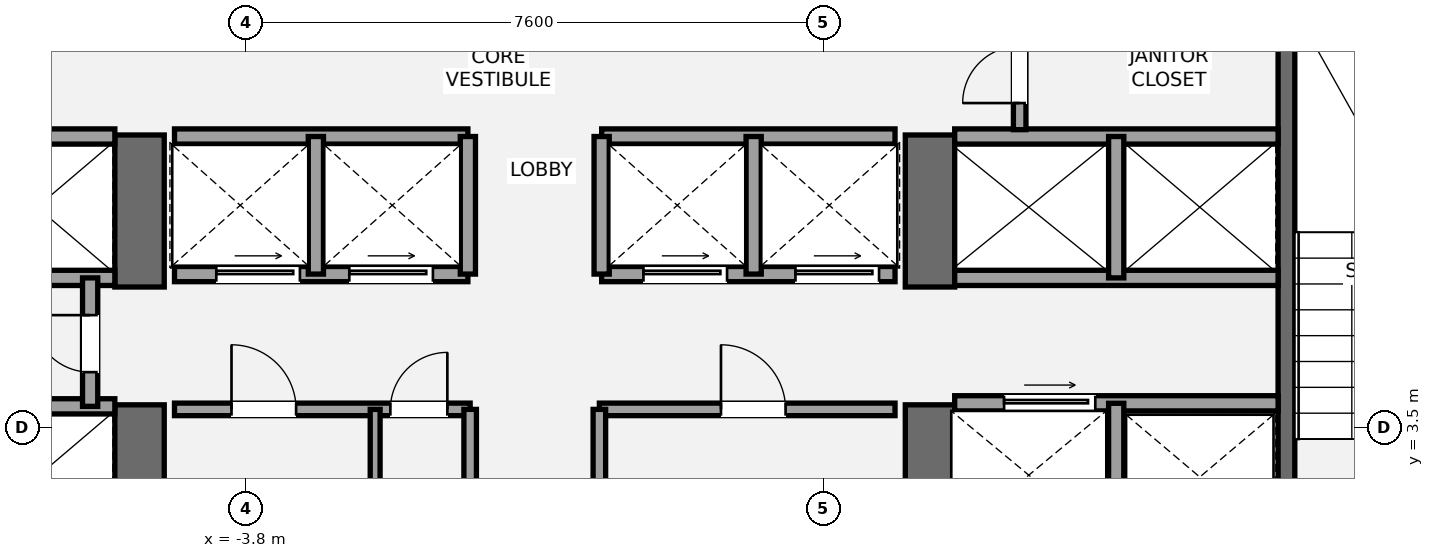
"""IFC4 building model, lengths in metres.
Left out: names, types, materials, properties, quantities, classifications, styles, units other than length and angle.
Written with IfcOpenShell. Run it as: python <this file> out.ifc"""

import sys

from ifc_helpers import new_model, si_unit, direction, frame, frame_2d, origin, place, context, subcontext, project, spatial, rectangle, extrude, element, fill, save


model = new_model("IFC4")
c1 = context("Model", 3, precision=1e-05, world=origin(), true_north=direction((0.0, 1.0)))
c2 = subcontext(c1, "Body", "Model", "MODEL_VIEW")
j1 = project(units=[si_unit("LENGTHUNIT", "METRE"), si_unit("PLANEANGLEUNIT", "RADIAN")], contexts=[c1])
p1 = place(None, origin())
s1 = spatial("IfcSite", under=j1, at=p1, CompositionType="ELEMENT")
p2 = place(p1, origin())
s2 = spatial("IfcBuilding", under=s1, at=p2, CompositionType="ELEMENT")
p3 = place(p2, frame((0.0, 0.0, 166.2)))
s3 = spatial("IfcBuildingStorey", under=s2, at=p3, CompositionType="ELEMENT", Elevation=166.2)
p4 = place(p3, frame((-5.2, 1.2, 0.0), z_axis=(0.0, 0.0, 1.0), x_axis=(0.0, 1.0, 0.0)))
e1 = element("IfcWall", 1, at=p4, inside=s3, PredefinedType="SHEAR", context=c2, shape_type="SweptSolid", body=[
    extrude(rectangle(XDim=2.6, YDim=0.65, at=frame_2d((1.3, 0.0))), origin(), (0.0, 0.0, 1.0), 3.2),
])
p5 = place(p3, frame((-5.2, 5.35, 0.0), z_axis=(0.0, 0.0, 1.0), x_axis=(0.0, 1.0, 0.0)))
e2 = element("IfcWall", 2, at=p5, inside=s3, PredefinedType="SHEAR", context=c2, shape_type="SweptSolid", body=[
    extrude(rectangle(XDim=2.0, YDim=0.65, at=frame_2d((1.0, 0.0))), origin(), (0.0, 0.0, 1.0), 3.2),
])
p6 = place(p3, frame((5.2, 1.2, 0.0), z_axis=(0.0, 0.0, 1.0), x_axis=(0.0, 1.0, 0.0)))
e3 = element("IfcWall", 3, at=p6, inside=s3, PredefinedType="SHEAR", context=c2, shape_type="SweptSolid", body=[
    extrude(rectangle(XDim=2.6, YDim=0.65, at=frame_2d((1.3, 0.0))), origin(), (0.0, 0.0, 1.0), 3.2),
])
p7 = place(p3, frame((5.2, 5.35, 0.0), z_axis=(0.0, 0.0, 1.0), x_axis=(0.0, 1.0, 0.0)))
e4 = element("IfcWall", 4, at=p7, inside=s3, PredefinedType="SHEAR", context=c2, shape_type="SweptSolid", body=[
    extrude(rectangle(XDim=2.0, YDim=0.65, at=frame_2d((1.0, 0.0))), origin(), (0.0, 0.0, 1.0), 3.2),
])
p8 = place(p3, frame((9.89, 1.85, 0.0), z_axis=(0.0, 0.0, 1.0), x_axis=(0.0, 1.0, 0.0)))
e5 = element("IfcWall", 5, at=p8, inside=s3, PredefinedType="SHEAR", context=c2, shape_type="SweptSolid", body=[
    extrude(rectangle(XDim=7.15, YDim=0.22, at=frame_2d((3.575, 0.0))), origin(), (0.0, 0.0, 1.0), 3.2),
])
for number, where, z_axis, x_axis in (
    (6, (-9.78, 3.78, 0.0), (0.0, 0.0, 1.0), (1.0, 0.0, 0.0)),
    (7, (-9.78, 5.47, 0.0), (0.0, 0.0, 1.0), (1.0, 0.0, 0.0)),
    (8, (-9.78, 7.33, 0.0), (0.0, 0.0, 1.0), (1.0, 0.0, 0.0)),
):
    element("IfcWall", number, at=place(p3, frame(where, z_axis=z_axis, x_axis=x_axis)), inside=s3, PredefinedType="SOLIDWALL", context=c2, shape_type="SweptSolid", body=[
        extrude(rectangle(XDim=4.255, YDim=0.2, at=frame_2d((2.127, 0.0))), origin(), (0.0, 0.0, 1.0), 3.02),
    ])
p9 = place(p3, frame((-5.85, 3.78, 0.0), z_axis=(0.0, 0.0, 1.0), x_axis=(0.0, 1.0, 0.0)))
e9 = element("IfcWall", 9, at=p9, inside=s3, PredefinedType="SOLIDWALL", context=c2, shape_type="SweptSolid", body=[
    extrude(rectangle(XDim=1.69, YDim=0.2, at=frame_2d((0.845, 0.0))), origin(), (0.0, 0.0, 1.0), 3.02),
])
p10 = place(p9, frame((0.45, 0.0, 0.0)))
e10 = element("IfcOpeningElement", 10, at=p10, cuts=e9, PredefinedType="OPENING", context=c2, shape_type="SweptSolid", body=[
    extrude(rectangle(XDim=0.75, YDim=2.1, at=frame_2d((0.375, 1.05))), frame((0.0, 0.11, 0.0), z_axis=(0.0, -1.0, 0.0), x_axis=(1.0, 0.0, 0.0)), (0.0, 0.0, 1.0), 0.22),
])
p11 = place(p3, frame((5.525, 3.82, 0.0), z_axis=(0.0, 0.0, 1.0), x_axis=(1.0, 0.0, 0.0)))
e11 = element("IfcWall", 11, at=p11, inside=s3, PredefinedType="SOLIDWALL", context=c2, shape_type="SweptSolid", body=[
    extrude(rectangle(XDim=4.255, YDim=0.2, at=frame_2d((2.127, 0.0))), origin(), (0.0, 0.0, 1.0), 3.02),
])
p12 = place(p11, frame((0.65, 0.0, 0.0)))
e12 = element("IfcOpeningElement", 12, at=p12, cuts=e11, PredefinedType="OPENING", context=c2, shape_type="SweptSolid", body=[
    extrude(rectangle(XDim=1.2, YDim=2.2, at=frame_2d((0.6, 1.1))), frame((0.0, 0.11, 0.0), z_axis=(0.0, -1.0, 0.0), x_axis=(1.0, 0.0, 0.0)), (0.0, 0.0, 1.0), 0.22),
])
p13 = place(p3, frame((7.65, 1.85, 0.0), z_axis=(0.0, 0.0, 1.0), x_axis=(0.0, 1.0, 0.0)))
e13 = element("IfcWall", 13, at=p13, inside=s3, PredefinedType="SOLIDWALL", context=c2, shape_type="SweptSolid", body=[
    extrude(rectangle(XDim=1.97, YDim=0.2, at=frame_2d((0.985, 0.0))), origin(), (0.0, 0.0, 1.0), 3.02),
])
for number, where, z_axis, x_axis in (
    (14, (5.525, 5.47, 0.0), (0.0, 0.0, 1.0), (1.0, 0.0, 0.0)),
    (15, (5.525, 7.33, 0.0), (0.0, 0.0, 1.0), (1.0, 0.0, 0.0)),
):
    element("IfcWall", number, at=place(p3, frame(where, z_axis=z_axis, x_axis=x_axis)), inside=s3, PredefinedType="SOLIDWALL", context=c2, shape_type="SweptSolid", body=[
        extrude(rectangle(XDim=4.255, YDim=0.2, at=frame_2d((2.127, 0.0))), origin(), (0.0, 0.0, 1.0), 3.02),
    ])
p14 = place(p3, frame((7.65, 5.47, 0.0), z_axis=(0.0, 0.0, 1.0), x_axis=(0.0, 1.0, 0.0)))
e16 = element("IfcWall", 16, at=p14, inside=s3, PredefinedType="SOLIDWALL", context=c2, shape_type="SweptSolid", body=[
    extrude(rectangle(XDim=1.86, YDim=0.2, at=frame_2d((0.93, 0.0))), origin(), (0.0, 0.0, 1.0), 3.02),
])
p15 = place(p3, frame((-4.74, 3.74, 0.0), z_axis=(0.0, 0.0, 1.0), x_axis=(1.0, 0.0, 0.0)))
e17 = element("IfcWall", 17, at=p15, inside=s3, PredefinedType="PARTITIONING", context=c2, shape_type="SweptSolid", body=[
    extrude(rectangle(XDim=3.89, YDim=0.165, at=frame_2d((1.945, 0.0))), origin(), (0.0, 0.0, 1.0), 3.02),
])
p16 = place(p15, frame((0.75, 0.0, 0.0)))
e18 = element("IfcOpeningElement", 18, at=p16, cuts=e17, PredefinedType="OPENING", context=c2, shape_type="SweptSolid", body=[
    extrude(rectangle(XDim=0.85, YDim=2.1, at=frame_2d((0.425, 1.05))), frame((0.0, 0.093, 0.0), z_axis=(0.0, -1.0, 0.0), x_axis=(1.0, 0.0, 0.0)), (0.0, 0.0, 1.0), 0.185),
])
p17 = place(p15, frame((2.84, 0.0, 0.0)))
e19 = element("IfcOpeningElement", 19, at=p17, cuts=e17, PredefinedType="OPENING", context=c2, shape_type="SweptSolid", body=[
    extrude(rectangle(XDim=0.75, YDim=2.1, at=frame_2d((0.375, 1.05))), frame((0.0, 0.093, 0.0), z_axis=(0.0, -1.0, 0.0), x_axis=(1.0, 0.0, 0.0)), (0.0, 0.0, 1.0), 0.185),
])
p18 = place(p3, frame((-0.85, 1.92, 0.0), z_axis=(0.0, 0.0, 1.0), x_axis=(0.0, 1.0, 0.0)))
e20 = element("IfcWall", 20, at=p18, inside=s3, PredefinedType="PARTITIONING", context=c2, shape_type="SweptSolid", body=[
    extrude(rectangle(XDim=1.82, YDim=0.165, at=frame_2d((0.91, 0.0))), origin(), (0.0, 0.0, 1.0), 3.02),
])
p19 = place(p3, frame((0.85, 3.74, 0.0), z_axis=(0.0, 0.0, 1.0), x_axis=(1.0, 0.0, 0.0)))
e21 = element("IfcWall", 21, at=p19, inside=s3, PredefinedType="PARTITIONING", context=c2, shape_type="SweptSolid", body=[
    extrude(rectangle(XDim=3.89, YDim=0.165, at=frame_2d((1.945, 0.0))), origin(), (0.0, 0.0, 1.0), 3.02),
])
p20 = place(p19, frame((1.6, 0.0, 0.0)))
e22 = element("IfcOpeningElement", 22, at=p20, cuts=e21, PredefinedType="OPENING", context=c2, shape_type="SweptSolid", body=[
    extrude(rectangle(XDim=0.85, YDim=2.1, at=frame_2d((0.425, 1.05))), frame((0.0, 0.093, 0.0), z_axis=(0.0, -1.0, 0.0), x_axis=(1.0, 0.0, 0.0)), (0.0, 0.0, 1.0), 0.185),
])
p21 = place(p3, frame((0.85, 1.92, 0.0), z_axis=(0.0, 0.0, 1.0), x_axis=(0.0, 1.0, 0.0)))
e23 = element("IfcWall", 23, at=p21, inside=s3, PredefinedType="PARTITIONING", context=c2, shape_type="SweptSolid", body=[
    extrude(rectangle(XDim=1.82, YDim=0.165, at=frame_2d((0.91, 0.0))), origin(), (0.0, 0.0, 1.0), 3.02),
])
p22 = place(p3, frame((-2.1, 1.92, 0.0), z_axis=(0.0, 0.0, 1.0), x_axis=(0.0, 1.0, 0.0)))
e24 = element("IfcWall", 24, at=p22, inside=s3, PredefinedType="PARTITIONING", context=c2, shape_type="SweptSolid", body=[
    extrude(rectangle(XDim=1.82, YDim=0.13, at=frame_2d((0.91, 0.0))), origin(), (0.0, 0.0, 1.0), 3.02),
])
p23 = place(p3, frame((-4.74, 5.52, 0.0), z_axis=(0.0, 0.0, 1.0), x_axis=(1.0, 0.0, 0.0)))
e25 = element("IfcWall", 25, at=p23, inside=s3, PredefinedType="SOLIDWALL", context=c2, shape_type="SweptSolid", body=[
    extrude(rectangle(XDim=3.86, YDim=0.2, at=frame_2d((1.93, 0.0))), origin(), (0.0, 0.0, 1.0), 3.02),
])
p24 = place(p23, frame((0.55, 0.0, 0.0)))
e26 = element("IfcOpeningElement", 26, at=p24, cuts=e25, PredefinedType="OPENING", context=c2, shape_type="SweptSolid", body=[
    extrude(rectangle(XDim=1.1, YDim=2.2, at=frame_2d((0.55, 1.1))), frame((0.0, 0.11, 0.0), z_axis=(0.0, -1.0, 0.0), x_axis=(1.0, 0.0, 0.0)), (0.0, 0.0, 1.0), 0.22),
])
p25 = place(p23, frame((2.3, 0.0, 0.0)))
e27 = element("IfcOpeningElement", 27, at=p25, cuts=e25, PredefinedType="OPENING", context=c2, shape_type="SweptSolid", body=[
    extrude(rectangle(XDim=1.1, YDim=2.2, at=frame_2d((0.55, 1.1))), frame((0.0, 0.11, 0.0), z_axis=(0.0, -1.0, 0.0), x_axis=(1.0, 0.0, 0.0)), (0.0, 0.0, 1.0), 0.22),
])
p26 = place(p3, frame((0.88, 5.52, 0.0), z_axis=(0.0, 0.0, 1.0), x_axis=(1.0, 0.0, 0.0)))
e28 = element("IfcWall", 28, at=p26, inside=s3, PredefinedType="SOLIDWALL", context=c2, shape_type="SweptSolid", body=[
    extrude(rectangle(XDim=3.86, YDim=0.2, at=frame_2d((1.93, 0.0))), origin(), (0.0, 0.0, 1.0), 3.02),
])
p27 = place(p26, frame((0.55, 0.0, 0.0)))
e29 = element("IfcOpeningElement", 29, at=p27, cuts=e28, PredefinedType="OPENING", context=c2, shape_type="SweptSolid", body=[
    extrude(rectangle(XDim=1.1, YDim=2.2, at=frame_2d((0.55, 1.1))), frame((0.0, 0.11, 0.0), z_axis=(0.0, -1.0, 0.0), x_axis=(1.0, 0.0, 0.0)), (0.0, 0.0, 1.0), 0.22),
])
p28 = place(p26, frame((2.55, 0.0, 0.0)))
e30 = element("IfcOpeningElement", 30, at=p28, cuts=e28, PredefinedType="OPENING", context=c2, shape_type="SweptSolid", body=[
    extrude(rectangle(XDim=1.1, YDim=2.2, at=frame_2d((0.55, 1.1))), frame((0.0, 0.11, 0.0), z_axis=(0.0, -1.0, 0.0), x_axis=(1.0, 0.0, 0.0)), (0.0, 0.0, 1.0), 0.22),
])
for number, where, z_axis, x_axis in (
    (31, (-4.74, 7.33, 0.0), (0.0, 0.0, 1.0), (1.0, 0.0, 0.0)),
    (32, (0.88, 7.33, 0.0), (0.0, 0.0, 1.0), (1.0, 0.0, 0.0)),
):
    element("IfcWall", number, at=place(p3, frame(where, z_axis=z_axis, x_axis=x_axis)), inside=s3, PredefinedType="SOLIDWALL", context=c2, shape_type="SweptSolid", body=[
        extrude(rectangle(XDim=3.86, YDim=0.2, at=frame_2d((1.93, 0.0))), origin(), (0.0, 0.0, 1.0), 3.02),
    ])
for number, where, z_axis, x_axis in (
    (33, (-2.88, 5.52, 0.0), (0.0, 0.0, 1.0), (0.0, 1.0, 0.0)),
    (34, (2.88, 5.52, 0.0), (0.0, 0.0, 1.0), (0.0, 1.0, 0.0)),
    (35, (-0.88, 5.52, 0.0), (0.0, 0.0, 1.0), (0.0, 1.0, 0.0)),
    (36, (0.88, 5.52, 0.0), (0.0, 0.0, 1.0), (0.0, 1.0, 0.0)),
):
    element("IfcWall", number, at=place(p3, frame(where, z_axis=z_axis, x_axis=x_axis)), inside=s3, PredefinedType="SOLIDWALL", context=c2, shape_type="SweptSolid", body=[
        extrude(rectangle(XDim=1.81, YDim=0.2, at=frame_2d((0.905, 0.0))), origin(), (0.0, 0.0, 1.0), 3.02),
    ])
p29 = place(p3, frame((6.38, 7.42, 0.0), z_axis=(0.0, 0.0, 1.0), x_axis=(0.0, 1.0, 0.0)))
e37 = element("IfcWall", 37, at=p29, inside=s3, PredefinedType="PARTITIONING", context=c2, shape_type="SweptSolid", body=[
    extrude(rectangle(XDim=1.58, YDim=0.165, at=frame_2d((0.79, 0.0))), origin(), (0.0, 0.0, 1.0), 3.02),
])
p30 = place(p29, frame((0.35, 0.0, 0.0)))
e38 = element("IfcOpeningElement", 38, at=p30, cuts=e37, PredefinedType="OPENING", context=c2, shape_type="SweptSolid", body=[
    extrude(rectangle(XDim=0.75, YDim=2.1, at=frame_2d((0.375, 1.05))), frame((0.0, 0.093, 0.0), z_axis=(0.0, -1.0, 0.0), x_axis=(1.0, 0.0, 0.0)), (0.0, 0.0, 1.0), 0.185),
])
p31 = place(p10, origin())
e39 = element("IfcDoor", 39, at=p31, inside=s3, OperationType="SINGLE_SWING_RIGHT", PredefinedType="DOOR", context=c2, shape_type="SweptSolid", body=[
    extrude(rectangle(XDim=0.75, YDim=2.1, at=frame_2d((0.375, 1.05))), frame((0.0, 0.025, 0.0), z_axis=(0.0, -1.0, 0.0), x_axis=(1.0, 0.0, 0.0)), (0.0, 0.0, 1.0), 0.05),
])
fill(e10, e39)
p32 = place(p12, origin())
e40 = element("IfcDoor", 40, at=p32, inside=s3, OperationType="SLIDING_TO_RIGHT", PredefinedType="DOOR", context=c2, shape_type="SweptSolid", body=[
    extrude(rectangle(XDim=1.2, YDim=2.2, at=frame_2d((0.6, 1.1))), frame((0.0, 0.025, 0.0), z_axis=(0.0, -1.0, 0.0), x_axis=(1.0, 0.0, 0.0)), (0.0, 0.0, 1.0), 0.05),
])
fill(e12, e40)
p33 = place(p16, origin())
e41 = element("IfcDoor", 41, at=p33, inside=s3, OperationType="SINGLE_SWING_LEFT", PredefinedType="DOOR", context=c2, shape_type="SweptSolid", body=[
    extrude(rectangle(XDim=0.85, YDim=2.1, at=frame_2d((0.425, 1.05))), frame((0.0, 0.025, 0.0), z_axis=(0.0, -1.0, 0.0), x_axis=(1.0, 0.0, 0.0)), (0.0, 0.0, 1.0), 0.05),
])
fill(e18, e41)
p34 = place(p17, origin())
e42 = element("IfcDoor", 42, at=p34, inside=s3, OperationType="SINGLE_SWING_RIGHT", PredefinedType="DOOR", context=c2, shape_type="SweptSolid", body=[
    extrude(rectangle(XDim=0.75, YDim=2.1, at=frame_2d((0.375, 1.05))), frame((0.0, 0.025, 0.0), z_axis=(0.0, -1.0, 0.0), x_axis=(1.0, 0.0, 0.0)), (0.0, 0.0, 1.0), 0.05),
])
fill(e19, e42)
p35 = place(p20, origin())
e43 = element("IfcDoor", 43, at=p35, inside=s3, OperationType="SINGLE_SWING_LEFT", PredefinedType="DOOR", context=c2, shape_type="SweptSolid", body=[
    extrude(rectangle(XDim=0.85, YDim=2.1, at=frame_2d((0.425, 1.05))), frame((0.0, 0.025, 0.0), z_axis=(0.0, -1.0, 0.0), x_axis=(1.0, 0.0, 0.0)), (0.0, 0.0, 1.0), 0.05),
])
fill(e22, e43)
p36 = place(p24, origin())
e44 = element("IfcDoor", 44, at=p36, inside=s3, OperationType="SLIDING_TO_LEFT", PredefinedType="DOOR", context=c2, shape_type="SweptSolid", body=[
    extrude(rectangle(XDim=1.1, YDim=2.2, at=frame_2d((0.55, 1.1))), frame((0.0, 0.025, 0.0), z_axis=(0.0, -1.0, 0.0), x_axis=(1.0, 0.0, 0.0)), (0.0, 0.0, 1.0), 0.05),
])
fill(e26, e44)
p37 = place(p25, origin())
e45 = element("IfcDoor", 45, at=p37, inside=s3, OperationType="SLIDING_TO_LEFT", PredefinedType="DOOR", context=c2, shape_type="SweptSolid", body=[
    extrude(rectangle(XDim=1.1, YDim=2.2, at=frame_2d((0.55, 1.1))), frame((0.0, 0.025, 0.0), z_axis=(0.0, -1.0, 0.0), x_axis=(1.0, 0.0, 0.0)), (0.0, 0.0, 1.0), 0.05),
])
fill(e27, e45)
p38 = place(p27, origin())
e46 = element("IfcDoor", 46, at=p38, inside=s3, OperationType="SLIDING_TO_LEFT", PredefinedType="DOOR", context=c2, shape_type="SweptSolid", body=[
    extrude(rectangle(XDim=1.1, YDim=2.2, at=frame_2d((0.55, 1.1))), frame((0.0, 0.025, 0.0), z_axis=(0.0, -1.0, 0.0), x_axis=(1.0, 0.0, 0.0)), (0.0, 0.0, 1.0), 0.05),
])
fill(e29, e46)
p39 = place(p28, origin())
e47 = element("IfcDoor", 47, at=p39, inside=s3, OperationType="SLIDING_TO_LEFT", PredefinedType="DOOR", context=c2, shape_type="SweptSolid", body=[
    extrude(rectangle(XDim=1.1, YDim=2.2, at=frame_2d((0.55, 1.1))), frame((0.0, 0.025, 0.0), z_axis=(0.0, -1.0, 0.0), x_axis=(1.0, 0.0, 0.0)), (0.0, 0.0, 1.0), 0.05),
])
fill(e30, e47)
p40 = place(p30, origin())
e48 = element("IfcDoor", 48, at=p40, inside=s3, OperationType="SINGLE_SWING_LEFT", PredefinedType="DOOR", context=c2, shape_type="SweptSolid", body=[
    extrude(rectangle(XDim=0.75, YDim=2.1, at=frame_2d((0.375, 1.05))), frame((0.0, 0.025, 0.0), z_axis=(0.0, -1.0, 0.0), x_axis=(1.0, 0.0, 0.0)), (0.0, 0.0, 1.0), 0.05),
])
fill(e38, e48)
save(model, sys.argv[1])
